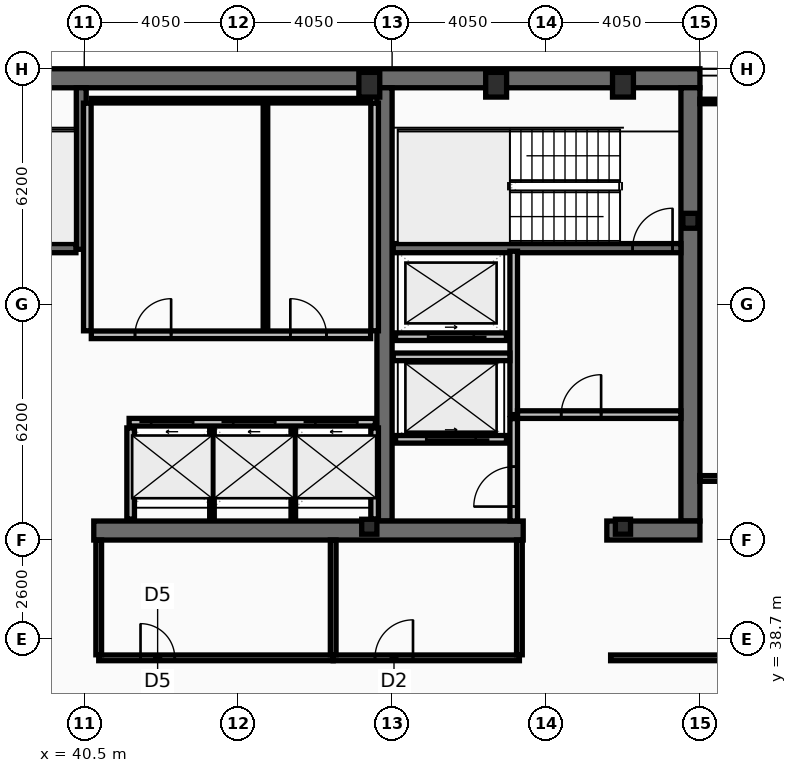
"""IFC4 building model, lengths in metres.
Left out: names, types, materials, properties, quantities, classifications, styles, units other than length and angle.
Written with IfcOpenShell. Run it as: python <this file> out.ifc"""

import sys

from ifc_helpers import new_model, si_unit, direction, frame, frame_2d, origin, origin_2d, place, context, subcontext, project, spatial, rectangle, hollow_rectangle, i_section, extrude, element, fill, save


model = new_model("IFC4")
c1 = context("Model", 3, precision=1e-05, world=origin(), true_north=direction((0.0, 1.0)))
c2 = subcontext(c1, "Body", "Model", "MODEL_VIEW")
j1 = project(units=[si_unit("LENGTHUNIT", "METRE"), si_unit("PLANEANGLEUNIT", "RADIAN")], contexts=[c1])
p1 = place(None, origin())
s1 = spatial("IfcSite", under=j1, at=p1, CompositionType="ELEMENT")
p2 = place(p1, origin())
s2 = spatial("IfcBuilding", under=s1, at=p2, CompositionType="ELEMENT")
p3 = place(p2, frame((0.0, 0.0, 295.0)))
s3 = spatial("IfcBuildingStorey", under=s2, at=p3, CompositionType="ELEMENT", Elevation=295.0)
p4 = place(p3, frame((16.2, 53.45, 0.0), z_axis=(0.0, 0.0, 1.0), x_axis=(1.0, 0.0, 0.0)))
e1 = element("IfcWall", 1, at=p4, inside=s3, PredefinedType="SHEAR", context=c2, shape_type="SweptSolid", body=[
    extrude(rectangle(XDim=40.5, YDim=0.5, at=frame_2d((20.25, 0.0))), origin(), (0.0, 0.0, 1.0), 3.44),
])
p5 = place(p3, frame((56.45, 53.2, 0.0), z_axis=(0.0, 0.0, 1.0), x_axis=(0.0, -1.0, 0.0)))
e2 = element("IfcWall", 2, at=p5, inside=s3, PredefinedType="SHEAR", context=c2, shape_type="SweptSolid", body=[
    extrude(rectangle(XDim=11.4, YDim=0.5, at=frame_2d((5.7, 0.0))), origin(), (0.0, 0.0, 1.0), 3.44),
])
p6 = place(p3, frame((48.4, 41.8, 0.0), z_axis=(0.0, 0.0, 1.0), x_axis=(0.0, 1.0, 0.0)))
e3 = element("IfcWall", 3, at=p6, inside=s3, PredefinedType="SHEAR", context=c2, shape_type="SweptSolid", body=[
    extrude(rectangle(XDim=11.4, YDim=0.4, at=frame_2d((5.7, 0.0))), origin(), (0.0, 0.0, 1.0), 3.44),
])
p7 = place(p3, frame((52.05, 41.55, 0.0), z_axis=(0.0, 0.0, 1.0), x_axis=(-1.0, 0.0, 0.0)))
e4 = element("IfcWall", 4, at=p7, inside=s3, PredefinedType="SHEAR", context=c2, shape_type="SweptSolid", body=[
    extrude(rectangle(XDim=11.3, YDim=0.5, at=frame_2d((5.65, 0.0))), origin(), (0.0, 0.0, 1.0), 3.44),
])
p8 = place(p3, frame((56.7, 41.55, 0.0), z_axis=(0.0, 0.0, 1.0), x_axis=(-1.0, 0.0, 0.0)))
e5 = element("IfcWall", 5, at=p8, inside=s3, PredefinedType="SHEAR", context=c2, shape_type="SweptSolid", body=[
    extrude(rectangle(XDim=2.45, YDim=0.5, at=frame_2d((1.225, 0.0))), origin(), (0.0, 0.0, 1.0), 3.44),
])
p9 = place(p3, frame((40.42, 48.95, 0.0), z_axis=(0.0, 0.0, 1.0), x_axis=(0.0, 1.0, 0.0)))
e6 = element("IfcWall", 6, at=p9, inside=s3, PredefinedType="SHEAR", context=c2, shape_type="SweptSolid", body=[
    extrude(rectangle(XDim=4.25, YDim=0.26, at=frame_2d((2.125, 0.0))), origin(), (0.0, 0.0, 1.0), 3.44),
])
p10 = place(p3, frame((48.63, 48.98, 0.0), z_axis=(0.0, 0.0, 1.0), x_axis=(1.0, 0.0, 0.0)))
e7 = element("IfcWall", 7, at=p10, inside=s3, PredefinedType="SHEAR", context=c2, shape_type="SweptSolid", body=[
    extrude(rectangle(XDim=7.57, YDim=0.24, at=frame_2d((3.785, 0.0))), origin(), (0.0, 0.0, 1.0), 3.44),
])
p11 = place(p10, frame((6.3, 0.0, 0.0)))
e8 = element("IfcOpeningElement", 8, at=p11, cuts=e7, PredefinedType="OPENING", context=c2, shape_type="SweptSolid", body=[
    extrude(rectangle(XDim=1.05, YDim=2.15, at=frame_2d((0.525, 1.075))), frame((0.0, 0.13, 0.0), z_axis=(0.0, -1.0, 0.0), x_axis=(1.0, 0.0, 0.0)), (0.0, 0.0, 1.0), 0.26),
])
p12 = place(p3, frame((32.72, 48.98, 0.0), z_axis=(0.0, 0.0, 1.0), x_axis=(1.0, 0.0, 0.0)))
e9 = element("IfcWall", 9, at=p12, inside=s3, PredefinedType="SHEAR", context=c2, shape_type="SweptSolid", body=[
    extrude(rectangle(XDim=7.56, YDim=0.24, at=frame_2d((3.78, 0.0))), origin(), (0.0, 0.0, 1.0), 3.44),
])
p13 = place(p12, frame((0.22, 0.0, 0.0)))
e10 = element("IfcOpeningElement", 10, at=p13, cuts=e9, PredefinedType="OPENING", context=c2, shape_type="SweptSolid", body=[
    extrude(rectangle(XDim=1.05, YDim=2.15, at=frame_2d((0.525, 1.075))), frame((0.0, 0.13, 0.0), z_axis=(0.0, -1.0, 0.0), x_axis=(1.0, 0.0, 0.0)), (0.0, 0.0, 1.0), 0.26),
])
for number, where, z_axis, x_axis in (
    (11, (48.0, 53.28, 0.0), (0.0, 0.0, 1.0), (1.0, 0.0, 0.0)),
    (12, (51.337, 53.28, 0.0), (0.0, 0.0, 1.0), (1.0, 0.0, 0.0)),
    (13, (54.675, 53.28, 0.0), (0.0, 0.0, 1.0), (1.0, 0.0, 0.0)),
):
    element("IfcColumn", number, at=place(p3, frame(where, z_axis=z_axis, x_axis=x_axis)), inside=s3, PredefinedType="COLUMN", context=c2, shape_type="SweptSolid", body=[
        extrude(hollow_rectangle(XDim=0.55, YDim=0.65, WallThickness=0.04, at=origin_2d()), origin(), (0.0, 0.0, 1.0), 3.6),
    ])
for number, where, z_axis, x_axis in (
    (14, (56.45, 49.7, 0.0), (0.0, 0.0, 1.0), (1.0, 0.0, 0.0)),
    (15, (48.0, 41.65, 0.0), (0.0, 0.0, 1.0), (1.0, 0.0, 0.0)),
    (16, (54.675, 41.65, 0.0), (0.0, 0.0, 1.0), (1.0, 0.0, 0.0)),
):
    element("IfcColumn", number, at=place(p3, frame(where, z_axis=z_axis, x_axis=x_axis)), inside=s3, PredefinedType="COLUMN", context=c2, shape_type="SweptSolid", body=[
        extrude(i_section(OverallWidth=0.399, OverallDepth=0.393, WebThickness=0.023, FlangeThickness=0.037, at=origin_2d()), origin(), (0.0, 0.0, 1.0), 3.6),
    ])
p14 = place(p3, frame((41.68, 44.4, 0.0), z_axis=(0.0, 0.0, 1.0), x_axis=(1.0, 0.0, 0.0)))
e17 = element("IfcWall", 17, at=p14, inside=s3, PredefinedType="PARTITIONING", context=c2, shape_type="SweptSolid", body=[
    extrude(rectangle(XDim=6.48, YDim=0.2, at=frame_2d((3.24, 0.0))), origin(), (0.0, 0.0, 1.0), 3.44),
])
p15 = place(p14, frame((0.58, 0.0, 0.0)))
e18 = element("IfcOpeningElement", 18, at=p15, cuts=e17, PredefinedType="OPENING", context=c2, shape_type="SweptSolid", body=[
    extrude(rectangle(XDim=1.1, YDim=2.18, at=frame_2d((0.55, 1.09))), frame((0.0, 0.11, 0.0), z_axis=(0.0, -1.0, 0.0), x_axis=(1.0, 0.0, 0.0)), (0.0, 0.0, 1.0), 0.22),
])
p16 = place(p14, frame((2.74, 0.0, 0.0)))
e19 = element("IfcOpeningElement", 19, at=p16, cuts=e17, PredefinedType="OPENING", context=c2, shape_type="SweptSolid", body=[
    extrude(rectangle(XDim=1.1, YDim=2.18, at=frame_2d((0.55, 1.09))), frame((0.0, 0.11, 0.0), z_axis=(0.0, -1.0, 0.0), x_axis=(1.0, 0.0, 0.0)), (0.0, 0.0, 1.0), 0.22),
])
p17 = place(p14, frame((4.9, 0.0, 0.0)))
e20 = element("IfcOpeningElement", 20, at=p17, cuts=e17, PredefinedType="OPENING", context=c2, shape_type="SweptSolid", body=[
    extrude(rectangle(XDim=1.1, YDim=2.18, at=frame_2d((0.55, 1.09))), frame((0.0, 0.11, 0.0), z_axis=(0.0, -1.0, 0.0), x_axis=(1.0, 0.0, 0.0)), (0.0, 0.0, 1.0), 0.22),
])
p18 = place(p3, frame((51.61, 43.95, 0.0), z_axis=(0.0, 0.0, 1.0), x_axis=(-1.0, 0.0, 0.0)))
e21 = element("IfcWall", 21, at=p18, inside=s3, PredefinedType="PARTITIONING", context=c2, shape_type="SweptSolid", body=[
    extrude(rectangle(XDim=2.92, YDim=0.2, at=frame_2d((1.46, 0.0))), origin(), (0.0, 0.0, 1.0), 3.44),
])
p19 = place(p18, frame((0.81, 0.0, 0.0)))
e22 = element("IfcOpeningElement", 22, at=p19, cuts=e21, PredefinedType="OPENING", context=c2, shape_type="SweptSolid", body=[
    extrude(rectangle(XDim=1.3, YDim=2.18, at=frame_2d((0.65, 1.09))), frame((0.0, 0.11, 0.0), z_axis=(0.0, -1.0, 0.0), x_axis=(1.0, 0.0, 0.0)), (0.0, 0.0, 1.0), 0.22),
])
p20 = place(p3, frame((51.61, 46.65, 0.0), z_axis=(0.0, 0.0, 1.0), x_axis=(-1.0, 0.0, 0.0)))
e23 = element("IfcWall", 23, at=p20, inside=s3, PredefinedType="PARTITIONING", context=c2, shape_type="SweptSolid", body=[
    extrude(rectangle(XDim=2.92, YDim=0.2, at=frame_2d((1.46, 0.0))), origin(), (0.0, 0.0, 1.0), 3.44),
])
p21 = place(p20, frame((0.86, 0.0, 0.0)))
e24 = element("IfcOpeningElement", 24, at=p21, cuts=e23, PredefinedType="OPENING", context=c2, shape_type="SweptSolid", body=[
    extrude(rectangle(XDim=1.2, YDim=2.18, at=frame_2d((0.6, 1.09))), frame((0.0, 0.11, 0.0), z_axis=(0.0, -1.0, 0.0), x_axis=(1.0, 0.0, 0.0)), (0.0, 0.0, 1.0), 0.22),
])
p22 = place(p3, frame((51.8, 44.6, 0.0), z_axis=(0.0, 0.0, 1.0), x_axis=(0.0, 1.0, 0.0)))
e25 = element("IfcWall", 25, at=p22, inside=s3, PredefinedType="PARTITIONING", context=c2, shape_type="SweptSolid", body=[
    extrude(rectangle(XDim=4.3, YDim=0.2, at=frame_2d((2.15, 0.0))), origin(), (0.0, 0.0, 1.0), 3.44),
])
p23 = place(p3, frame((51.9, 44.6, 0.0), z_axis=(0.0, 0.0, 1.0), x_axis=(1.0, 0.0, 0.0)))
e26 = element("IfcWall", 26, at=p23, inside=s3, PredefinedType="PARTITIONING", context=c2, shape_type="SweptSolid", body=[
    extrude(rectangle(XDim=4.3, YDim=0.2, at=frame_2d((2.15, 0.0))), origin(), (0.0, 0.0, 1.0), 3.44),
])
p24 = place(p23, frame((1.15, 0.0, 0.0)))
e27 = element("IfcOpeningElement", 27, at=p24, cuts=e26, PredefinedType="OPENING", context=c2, shape_type="SweptSolid", body=[
    extrude(rectangle(XDim=1.05, YDim=2.15, at=frame_2d((0.525, 1.075))), frame((0.0, 0.11, 0.0), z_axis=(0.0, -1.0, 0.0), x_axis=(1.0, 0.0, 0.0)), (0.0, 0.0, 1.0), 0.22),
])
p25 = place(p3, frame((48.63, 46.12, 0.0), z_axis=(0.0, 0.0, 1.0), x_axis=(1.0, 0.0, 0.0)))
e28 = element("IfcWall", 28, at=p25, inside=s3, PredefinedType="PARTITIONING", context=c2, shape_type="SweptSolid", body=[
    extrude(rectangle(XDim=3.07, YDim=0.2, at=frame_2d((1.535, 0.0))), origin(), (0.0, 0.0, 1.0), 3.44),
])
p26 = place(p3, frame((51.8, 41.8, 0.0), z_axis=(0.0, 0.0, 1.0), x_axis=(0.0, 1.0, 0.0)))
e29 = element("IfcWall", 29, at=p26, inside=s3, PredefinedType="PARTITIONING", context=c2, shape_type="SweptSolid", body=[
    extrude(rectangle(XDim=2.695, YDim=0.2, at=frame_2d((1.348, 0.0))), origin(), (0.0, 0.0, 1.0), 3.44),
])
p27 = place(p26, frame((0.38, 0.0, 0.0)))
e30 = element("IfcOpeningElement", 30, at=p27, cuts=e29, PredefinedType="OPENING", context=c2, shape_type="SweptSolid", body=[
    extrude(rectangle(XDim=1.05, YDim=2.15, at=frame_2d((0.525, 1.075))), frame((0.0, 0.11, 0.0), z_axis=(0.0, -1.0, 0.0), x_axis=(1.0, 0.0, 0.0)), (0.0, 0.0, 1.0), 0.22),
])
for number, where, z_axis, x_axis in (
    (31, (40.58, 46.805, 0.0), (0.0, 0.0, 1.0), (0.0, 1.0, 0.0)),
    (32, (48.14, 46.805, 0.0), (0.0, 0.0, 1.0), (0.0, 1.0, 0.0)),
):
    element("IfcWall", number, at=place(p3, frame(where, z_axis=z_axis, x_axis=x_axis)), inside=s3, PredefinedType="PARTITIONING", context=c2, shape_type="SweptSolid", body=[
        extrude(rectangle(XDim=5.99, YDim=0.2, at=frame_2d((2.995, 0.0))), origin(), (0.0, 0.0, 1.0), 3.44),
    ])
p28 = place(p3, frame((40.685, 52.86, 0.0), z_axis=(0.0, 0.0, 1.0), x_axis=(1.0, 0.0, 0.0)))
e33 = element("IfcWall", 33, at=p28, inside=s3, PredefinedType="PARTITIONING", context=c2, shape_type="SweptSolid", body=[
    extrude(rectangle(XDim=7.35, YDim=0.12, at=frame_2d((3.675, 0.0))), origin(), (0.0, 0.0, 1.0), 3.44),
])
p29 = place(p3, frame((45.267, 46.805, 0.0), z_axis=(0.0, 0.0, 1.0), x_axis=(0.0, 1.0, 0.0)))
e34 = element("IfcWall", 34, at=p29, inside=s3, PredefinedType="PARTITIONING", context=c2, shape_type="SweptSolid", body=[
    extrude(rectangle(XDim=5.99, YDim=0.12, at=frame_2d((2.995, 0.0))), origin(), (0.0, 0.0, 1.0), 3.44),
])
p30 = place(p3, frame((40.685, 46.7, 0.0), z_axis=(0.0, 0.0, 1.0), x_axis=(1.0, 0.0, 0.0)))
e35 = element("IfcWall", 35, at=p30, inside=s3, PredefinedType="PARTITIONING", context=c2, shape_type="SweptSolid", body=[
    extrude(rectangle(XDim=7.35, YDim=0.2, at=frame_2d((3.675, 0.0))), origin(), (0.0, 0.0, 1.0), 3.44),
])
p31 = place(p30, frame((1.15, 0.0, 0.0)))
e36 = element("IfcOpeningElement", 36, at=p31, cuts=e35, PredefinedType="OPENING", context=c2, shape_type="SweptSolid", body=[
    extrude(rectangle(XDim=0.95, YDim=2.1, at=frame_2d((0.475, 1.05))), frame((0.0, 0.11, 0.0), z_axis=(0.0, -1.0, 0.0), x_axis=(1.0, 0.0, 0.0)), (0.0, 0.0, 1.0), 0.22),
])
p32 = place(p30, frame((5.237, 0.0, 0.0)))
e37 = element("IfcOpeningElement", 37, at=p32, cuts=e35, PredefinedType="OPENING", context=c2, shape_type="SweptSolid", body=[
    extrude(rectangle(XDim=0.95, YDim=2.1, at=frame_2d((0.475, 1.05))), frame((0.0, 0.11, 0.0), z_axis=(0.0, -1.0, 0.0), x_axis=(1.0, 0.0, 0.0)), (0.0, 0.0, 1.0), 0.22),
])
for number, where, z_axis, x_axis in (
    (38, (41.72, 41.85, 0.0), (0.0, 0.0, 1.0), (0.0, 1.0, 0.0)),
    (39, (48.14, 41.85, 0.0), (0.0, 0.0, 1.0), (0.0, 1.0, 0.0)),
):
    element("IfcWall", number, at=place(p3, frame(where, z_axis=z_axis, x_axis=x_axis)), inside=s3, PredefinedType="PARTITIONING", context=c2, shape_type="SweptSolid", body=[
        extrude(rectangle(XDim=2.4, YDim=0.2, at=frame_2d((1.2, 0.0))), origin(), (0.0, 0.0, 1.0), 3.44),
    ])
for number, where, z_axis, x_axis in (
    (40, (43.86, 41.85, 0.0), (0.0, 0.0, 1.0), (0.0, 1.0, 0.0)),
    (41, (46.0, 41.85, 0.0), (0.0, 0.0, 1.0), (0.0, 1.0, 0.0)),
):
    element("IfcWall", number, at=place(p3, frame(where, z_axis=z_axis, x_axis=x_axis)), inside=s3, PredefinedType="PARTITIONING", context=c2, shape_type="SweptSolid", body=[
        extrude(rectangle(XDim=2.4, YDim=0.12, at=frame_2d((1.2, 0.0))), origin(), (0.0, 0.0, 1.0), 3.44),
    ])
p33 = place(p3, frame((40.88, 38.2, 0.0), z_axis=(0.0, 0.0, 1.0), x_axis=(1.0, 0.0, 0.0)))
e42 = element("IfcWall", 42, at=p33, inside=s3, PredefinedType="PARTITIONING", context=c2, shape_type="SweptSolid", body=[
    extrude(rectangle(XDim=6.17, YDim=0.15, at=frame_2d((3.085, 0.0))), origin(), (0.0, 0.0, 1.0), 2.78),
])
p34 = place(p33, frame((1.1, 0.0, 0.0)))
e43 = element("IfcOpeningElement", 43, at=p34, cuts=e42, PredefinedType="OPENING", context=c2, shape_type="SweptSolid", body=[
    extrude(rectangle(XDim=0.9, YDim=2.05, at=frame_2d((0.45, 1.025))), frame((0.0, 0.085, 0.0), z_axis=(0.0, -1.0, 0.0), x_axis=(1.0, 0.0, 0.0)), (0.0, 0.0, 1.0), 0.17),
])
p35 = place(p3, frame((47.05, 38.2, 0.0), z_axis=(0.0, 0.0, 1.0), x_axis=(1.0, 0.0, 0.0)))
e44 = element("IfcWall", 44, at=p35, inside=s3, PredefinedType="PARTITIONING", context=c2, shape_type="SweptSolid", body=[
    extrude(rectangle(XDim=4.9, YDim=0.15, at=frame_2d((2.45, 0.0))), origin(), (0.0, 0.0, 1.0), 2.78),
])
p36 = place(p35, frame((1.1, 0.0, 0.0)))
e45 = element("IfcOpeningElement", 45, at=p36, cuts=e44, PredefinedType="OPENING", context=c2, shape_type="SweptSolid", body=[
    extrude(rectangle(XDim=1.0, YDim=2.05, at=frame_2d((0.5, 1.025))), frame((0.0, 0.085, 0.0), z_axis=(0.0, -1.0, 0.0), x_axis=(1.0, 0.0, 0.0)), (0.0, 0.0, 1.0), 0.17),
])
for number, where, z_axis, x_axis in (
    (46, (40.88, 38.28, 0.0), (0.0, 0.0, 1.0), (0.0, 1.0, 0.0)),
    (47, (47.05, 38.28, 0.0), (0.0, 0.0, 1.0), (0.0, 1.0, 0.0)),
    (48, (51.95, 38.28, 0.0), (0.0, 0.0, 1.0), (0.0, 1.0, 0.0)),
):
    element("IfcWall", number, at=place(p3, frame(where, z_axis=z_axis, x_axis=x_axis)), inside=s3, PredefinedType="PARTITIONING", context=c2, shape_type="SweptSolid", body=[
        extrude(rectangle(XDim=3.02, YDim=0.15, at=frame_2d((1.51, 0.0))), origin(), (0.0, 0.0, 1.0), 3.44),
    ])
p37 = place(p3, frame((54.35, 38.2, 0.0), z_axis=(0.0, 0.0, 1.0), x_axis=(1.0, 0.0, 0.0)))
e49 = element("IfcWall", 49, at=p37, inside=s3, PredefinedType="PARTITIONING", context=c2, shape_type="SweptSolid", body=[
    extrude(rectangle(XDim=6.52, YDim=0.15, at=frame_2d((3.26, 0.0))), origin(), (0.0, 0.0, 1.0), 2.78),
])
p38 = place(p37, frame((3.25, 0.0, 0.0)))
e50 = element("IfcOpeningElement", 50, at=p38, cuts=e49, PredefinedType="OPENING", context=c2, shape_type="SweptSolid", body=[
    extrude(rectangle(XDim=0.95, YDim=2.05, at=frame_2d((0.475, 1.025))), frame((0.0, 0.085, 0.0), z_axis=(0.0, -1.0, 0.0), x_axis=(1.0, 0.0, 0.0)), (0.0, 0.0, 1.0), 0.17),
])
p39 = place(p3, frame((56.7, 42.92, 0.0), z_axis=(0.0, 0.0, 1.0), x_axis=(1.0, 0.0, 0.0)))
e51 = element("IfcWall", 51, at=p39, inside=s3, PredefinedType="PARTITIONING", context=c2, shape_type="SweptSolid", body=[
    extrude(rectangle(XDim=4.105, YDim=0.15, at=frame_2d((2.052, 0.0))), origin(), (0.0, 0.0, 1.0), 2.78),
])
p40 = place(p39, frame((0.9, 0.0, 0.0)))
e52 = element("IfcOpeningElement", 52, at=p40, cuts=e51, PredefinedType="OPENING", context=c2, shape_type="SweptSolid", body=[
    extrude(rectangle(XDim=0.9, YDim=2.05, at=frame_2d((0.45, 1.025))), frame((0.0, 0.085, 0.0), z_axis=(0.0, -1.0, 0.0), x_axis=(1.0, 0.0, 0.0)), (0.0, 0.0, 1.0), 0.17),
])
p41 = place(p3, frame((56.7, 52.84, 0.0), z_axis=(0.0, 0.0, 1.0), x_axis=(1.0, 0.0, 0.0)))
e53 = element("IfcWall", 53, at=p41, inside=s3, PredefinedType="PARTITIONING", context=c2, shape_type="SweptSolid", body=[
    extrude(rectangle(XDim=4.105, YDim=0.12, at=frame_2d((2.052, 0.0))), origin(), (0.0, 0.0, 1.0), 3.44),
])
p42 = place(p11, origin())
e54 = element("IfcDoor", 54, at=p42, inside=s3, OperationType="SINGLE_SWING_RIGHT", PredefinedType="DOOR", context=c2, shape_type="SweptSolid", body=[
    extrude(rectangle(XDim=1.05, YDim=2.15, at=frame_2d((0.525, 1.075))), frame((0.0, 0.025, 0.0), z_axis=(0.0, -1.0, 0.0), x_axis=(1.0, 0.0, 0.0)), (0.0, 0.0, 1.0), 0.05),
])
fill(e8, e54)
p43 = place(p15, origin())
e55 = element("IfcDoor", 55, at=p43, inside=s3, OperationType="SLIDING_TO_LEFT", PredefinedType="DOOR", context=c2, shape_type="SweptSolid", body=[
    extrude(rectangle(XDim=1.1, YDim=2.18, at=frame_2d((0.55, 1.09))), frame((0.0, 0.025, 0.0), z_axis=(0.0, -1.0, 0.0), x_axis=(1.0, 0.0, 0.0)), (0.0, 0.0, 1.0), 0.05),
])
fill(e18, e55)
p44 = place(p16, origin())
e56 = element("IfcDoor", 56, at=p44, inside=s3, OperationType="SLIDING_TO_LEFT", PredefinedType="DOOR", context=c2, shape_type="SweptSolid", body=[
    extrude(rectangle(XDim=1.1, YDim=2.18, at=frame_2d((0.55, 1.09))), frame((0.0, 0.025, 0.0), z_axis=(0.0, -1.0, 0.0), x_axis=(1.0, 0.0, 0.0)), (0.0, 0.0, 1.0), 0.05),
])
fill(e19, e56)
p45 = place(p17, origin())
e57 = element("IfcDoor", 57, at=p45, inside=s3, OperationType="SLIDING_TO_LEFT", PredefinedType="DOOR", context=c2, shape_type="SweptSolid", body=[
    extrude(rectangle(XDim=1.1, YDim=2.18, at=frame_2d((0.55, 1.09))), frame((0.0, 0.025, 0.0), z_axis=(0.0, -1.0, 0.0), x_axis=(1.0, 0.0, 0.0)), (0.0, 0.0, 1.0), 0.05),
])
fill(e20, e57)
p46 = place(p19, origin())
e58 = element("IfcDoor", 58, at=p46, inside=s3, OperationType="SLIDING_TO_LEFT", PredefinedType="DOOR", context=c2, shape_type="SweptSolid", body=[
    extrude(rectangle(XDim=1.3, YDim=2.18, at=frame_2d((0.65, 1.09))), frame((0.0, 0.025, 0.0), z_axis=(0.0, -1.0, 0.0), x_axis=(1.0, 0.0, 0.0)), (0.0, 0.0, 1.0), 0.05),
])
fill(e22, e58)
p47 = place(p21, origin())
e59 = element("IfcDoor", 59, at=p47, inside=s3, OperationType="SLIDING_TO_LEFT", PredefinedType="DOOR", context=c2, shape_type="SweptSolid", body=[
    extrude(rectangle(XDim=1.2, YDim=2.18, at=frame_2d((0.6, 1.09))), frame((0.0, 0.025, 0.0), z_axis=(0.0, -1.0, 0.0), x_axis=(1.0, 0.0, 0.0)), (0.0, 0.0, 1.0), 0.05),
])
fill(e24, e59)
p48 = place(p24, origin())
e60 = element("IfcDoor", 60, at=p48, inside=s3, OperationType="SINGLE_SWING_RIGHT", PredefinedType="DOOR", context=c2, shape_type="SweptSolid", body=[
    extrude(rectangle(XDim=1.05, YDim=2.15, at=frame_2d((0.525, 1.075))), frame((0.0, 0.025, 0.0), z_axis=(0.0, -1.0, 0.0), x_axis=(1.0, 0.0, 0.0)), (0.0, 0.0, 1.0), 0.05),
])
fill(e27, e60)
p49 = place(p27, origin())
e61 = element("IfcDoor", 61, at=p49, inside=s3, OperationType="SINGLE_SWING_LEFT", PredefinedType="DOOR", context=c2, shape_type="SweptSolid", body=[
    extrude(rectangle(XDim=1.05, YDim=2.15, at=frame_2d((0.525, 1.075))), frame((0.0, 0.025, 0.0), z_axis=(0.0, -1.0, 0.0), x_axis=(1.0, 0.0, 0.0)), (0.0, 0.0, 1.0), 0.05),
])
fill(e30, e61)
p50 = place(p31, origin())
e62 = element("IfcDoor", 62, at=p50, inside=s3, OperationType="SINGLE_SWING_RIGHT", PredefinedType="DOOR", context=c2, shape_type="SweptSolid", body=[
    extrude(rectangle(XDim=0.95, YDim=2.1, at=frame_2d((0.475, 1.05))), frame((0.0, 0.025, 0.0), z_axis=(0.0, -1.0, 0.0), x_axis=(1.0, 0.0, 0.0)), (0.0, 0.0, 1.0), 0.05),
])
fill(e36, e62)
p51 = place(p32, origin())
e63 = element("IfcDoor", 63, at=p51, inside=s3, OperationType="SINGLE_SWING_LEFT", PredefinedType="DOOR", context=c2, shape_type="SweptSolid", body=[
    extrude(rectangle(XDim=0.95, YDim=2.1, at=frame_2d((0.475, 1.05))), frame((0.0, 0.025, 0.0), z_axis=(0.0, -1.0, 0.0), x_axis=(1.0, 0.0, 0.0)), (0.0, 0.0, 1.0), 0.05),
])
fill(e37, e63)
p52 = place(p34, origin())
e64 = element("IfcDoor", 64, at=p52, inside=s3, OperationType="SINGLE_SWING_LEFT", PredefinedType="DOOR", context=c2, shape_type="SweptSolid", body=[
    extrude(rectangle(XDim=0.9, YDim=2.05, at=frame_2d((0.45, 1.025))), frame((0.0, 0.025, 0.0), z_axis=(0.0, -1.0, 0.0), x_axis=(1.0, 0.0, 0.0)), (0.0, 0.0, 1.0), 0.05),
])
fill(e43, e64)
p53 = place(p36, origin())
e65 = element("IfcDoor", 65, at=p53, inside=s3, OperationType="SINGLE_SWING_RIGHT", PredefinedType="DOOR", context=c2, shape_type="SweptSolid", body=[
    extrude(rectangle(XDim=1.0, YDim=2.05, at=frame_2d((0.5, 1.025))), frame((0.0, 0.025, 0.0), z_axis=(0.0, -1.0, 0.0), x_axis=(1.0, 0.0, 0.0)), (0.0, 0.0, 1.0), 0.05),
])
fill(e45, e65)
save(model, sys.argv[1])
